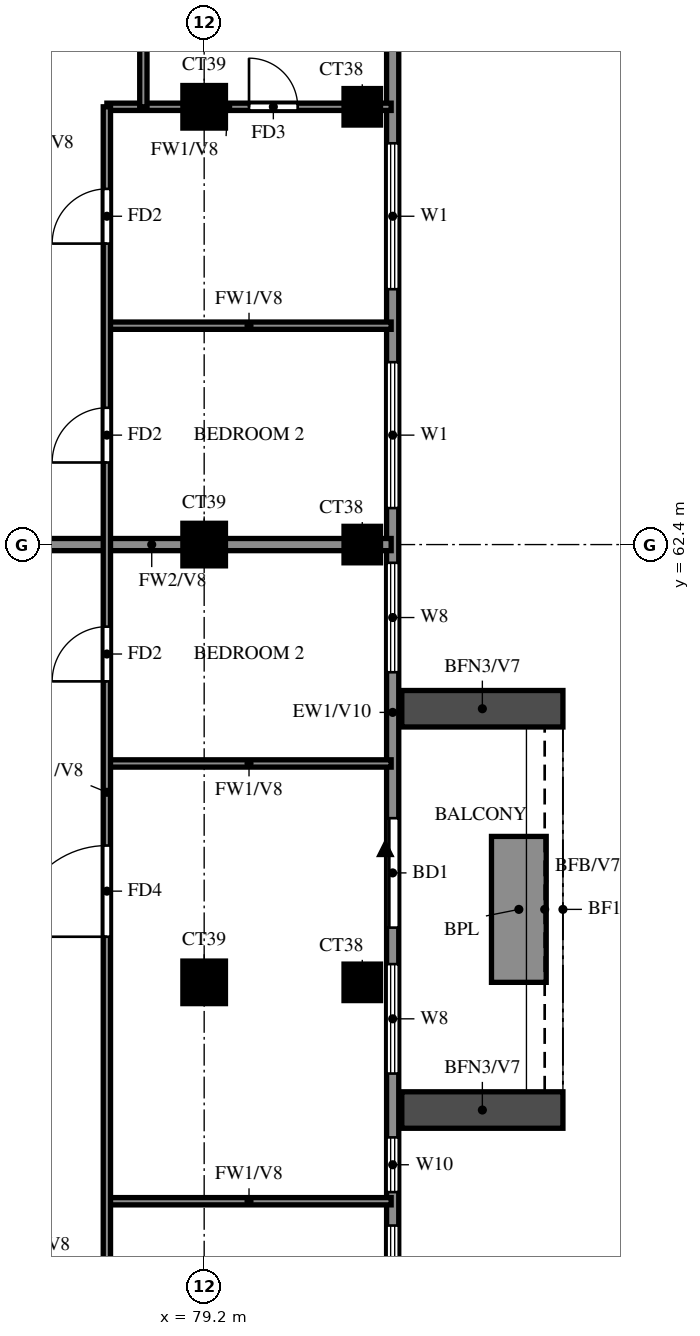
"""IFC4 building model, lengths in metres.
Left out: names, types, materials, properties, quantities, classifications, styles, units other than length and angle.
Written with IfcOpenShell. Run it as: python <this file> out.ifc"""

import sys

from ifc_helpers import new_model, si_unit, direction, frame, frame_2d, origin, origin_2d, place, context, subcontext, project, spatial, rectangle, extrude, source, transform, mapped, element, fill, save


model = new_model("IFC4")
c1 = context("Model", 3, precision=1e-05, world=origin(), true_north=direction((0.0, 1.0)))
c2 = subcontext(c1, "Body", "Model", "MODEL_VIEW")
j1 = project(units=[si_unit("LENGTHUNIT", "METRE"), si_unit("PLANEANGLEUNIT", "RADIAN")], contexts=[c1])
p1 = place(None, origin())
s1 = spatial("IfcSite", under=j1, at=p1, CompositionType="ELEMENT")
p2 = place(p1, origin())
s2 = spatial("IfcBuilding", under=s1, at=p2, CompositionType="ELEMENT")
p3 = place(p2, frame((0.0, 0.0, 267.5)))
s3 = spatial("IfcBuildingStorey", under=s2, at=p3, CompositionType="ELEMENT", Elevation=267.5)
m1 = source(origin(), c2, "Body", "SweptSolid", [
    extrude(rectangle(XDim=0.7, YDim=0.7, at=origin_2d()), origin(), (0.0, 0.0, 1.0), 3.099),
])
p4 = place(p3, frame((79.2, 55.2, 0.0), z_axis=(0.0, 0.0, 1.0), x_axis=(1.0, 0.0, 0.0)))
e1 = element("IfcColumn", 1, at=p4, inside=s3, PredefinedType="COLUMN", context=c2, shape_type="MappedRepresentation", body=[
    mapped(m1, transform((0.0, 0.0, 0.0))),
])
m2 = source(origin(), c2, "Body", "SweptSolid", [
    extrude(rectangle(XDim=0.6, YDim=0.6, at=origin_2d()), origin(), (0.0, 0.0, 1.0), 3.099),
])
p5 = place(p3, frame((81.8, 55.2, 0.0), z_axis=(0.0, 0.0, 1.0), x_axis=(1.0, 0.0, 0.0)))
e2 = element("IfcColumn", 2, at=p5, inside=s3, PredefinedType="COLUMN", context=c2, shape_type="MappedRepresentation", body=[
    mapped(m2, transform((0.0, 0.0, 0.0))),
])
p6 = place(p3, frame((79.2, 62.4, 0.0), z_axis=(0.0, 0.0, 1.0), x_axis=(1.0, 0.0, 0.0)))
e3 = element("IfcColumn", 3, at=p6, inside=s3, PredefinedType="COLUMN", context=c2, shape_type="MappedRepresentation", body=[
    mapped(m1, transform((0.0, 0.0, 0.0))),
])
p7 = place(p3, frame((81.8, 62.4, 0.0), z_axis=(0.0, 0.0, 1.0), x_axis=(1.0, 0.0, 0.0)))
e4 = element("IfcColumn", 4, at=p7, inside=s3, PredefinedType="COLUMN", context=c2, shape_type="MappedRepresentation", body=[
    mapped(m2, transform((0.0, 0.0, 0.0))),
])
p8 = place(p3, frame((79.2, 69.6, 0.0), z_axis=(0.0, 0.0, 1.0), x_axis=(1.0, 0.0, 0.0)))
e5 = element("IfcColumn", 5, at=p8, inside=s3, PredefinedType="COLUMN", context=c2, shape_type="MappedRepresentation", body=[
    mapped(m1, transform((0.0, 0.0, 0.0))),
])
p9 = place(p3, frame((81.8, 69.6, 0.0), z_axis=(0.0, 0.0, 1.0), x_axis=(1.0, 0.0, 0.0)))
e6 = element("IfcColumn", 6, at=p9, inside=s3, PredefinedType="COLUMN", context=c2, shape_type="MappedRepresentation", body=[
    mapped(m2, transform((0.0, 0.0, 0.0))),
])
p10 = place(p3, frame((82.3, 48.2, 0.0), z_axis=(0.0, 0.0, 1.0), x_axis=(0.0, 1.0, 0.0)))
e7 = element("IfcWall", 7, at=p10, inside=s3, PredefinedType="SOLIDWALL", context=c2, shape_type="SweptSolid", body=[
    extrude(rectangle(XDim=28.6, YDim=0.2, at=frame_2d((14.3, 0.0))), origin(), (0.0, 0.0, 1.0), 3.099),
])
p11 = place(p10, frame((7.9, 0.0, 0.0)))
e8 = element("IfcOpeningElement", 8, at=p11, cuts=e7, PredefinedType="OPENING", context=c2, shape_type="SweptSolid", body=[
    extrude(rectangle(XDim=1.8, YDim=2.4, at=frame_2d((0.9, 1.2))), frame((0.0, 0.11, 0.0), z_axis=(0.0, -1.0, 0.0), x_axis=(1.0, 0.0, 0.0)), (0.0, 0.0, 1.0), 0.22),
])
p12 = place(p10, frame((0.6, 0.0, 0.6)))
e9 = element("IfcOpeningElement", 9, at=p12, cuts=e7, PredefinedType="OPENING", context=c2, shape_type="SweptSolid", body=[
    extrude(rectangle(XDim=2.4, YDim=2.4, at=frame_2d((1.2, 1.2))), frame((0.0, 0.11, 0.0), z_axis=(0.0, -1.0, 0.0), x_axis=(1.0, 0.0, 0.0)), (0.0, 0.0, 1.0), 0.22),
])
p13 = place(p10, frame((3.55, 0.0, 0.6)))
e10 = element("IfcOpeningElement", 10, at=p13, cuts=e7, PredefinedType="OPENING", context=c2, shape_type="SweptSolid", body=[
    extrude(rectangle(XDim=0.9, YDim=2.4, at=frame_2d((0.45, 1.2))), frame((0.0, 0.11, 0.0), z_axis=(0.0, -1.0, 0.0), x_axis=(1.0, 0.0, 0.0)), (0.0, 0.0, 1.0), 0.22),
])
p14 = place(p10, frame((5.5, 0.0, 0.6)))
e11 = element("IfcOpeningElement", 11, at=p14, cuts=e7, PredefinedType="OPENING", context=c2, shape_type="SweptSolid", body=[
    extrude(rectangle(XDim=1.8, YDim=2.4, at=frame_2d((0.9, 1.2))), frame((0.0, 0.11, 0.0), z_axis=(0.0, -1.0, 0.0), x_axis=(1.0, 0.0, 0.0)), (0.0, 0.0, 1.0), 0.22),
])
p15 = place(p10, frame((12.1, 0.0, 0.6)))
e12 = element("IfcOpeningElement", 12, at=p15, cuts=e7, PredefinedType="OPENING", context=c2, shape_type="SweptSolid", body=[
    extrude(rectangle(XDim=1.8, YDim=2.4, at=frame_2d((0.9, 1.2))), frame((0.0, 0.11, 0.0), z_axis=(0.0, -1.0, 0.0), x_axis=(1.0, 0.0, 0.0)), (0.0, 0.0, 1.0), 0.22),
])
p16 = place(p10, frame((14.8, 0.0, 0.6)))
e13 = element("IfcOpeningElement", 13, at=p16, cuts=e7, PredefinedType="OPENING", context=c2, shape_type="SweptSolid", body=[
    extrude(rectangle(XDim=2.4, YDim=2.4, at=frame_2d((1.2, 1.2))), frame((0.0, 0.11, 0.0), z_axis=(0.0, -1.0, 0.0), x_axis=(1.0, 0.0, 0.0)), (0.0, 0.0, 1.0), 0.22),
])
p17 = place(p10, frame((18.4, 0.0, 0.6)))
e14 = element("IfcOpeningElement", 14, at=p17, cuts=e7, PredefinedType="OPENING", context=c2, shape_type="SweptSolid", body=[
    extrude(rectangle(XDim=2.4, YDim=2.4, at=frame_2d((1.2, 1.2))), frame((0.0, 0.11, 0.0), z_axis=(0.0, -1.0, 0.0), x_axis=(1.0, 0.0, 0.0)), (0.0, 0.0, 1.0), 0.22),
])
p18 = place(p10, frame((22.75, 0.0, 1.5)))
e15 = element("IfcOpeningElement", 15, at=p18, cuts=e7, PredefinedType="OPENING", context=c2, shape_type="SweptSolid", body=[
    extrude(rectangle(XDim=0.9, YDim=0.9, at=frame_2d((0.45, 0.45))), frame((0.0, 0.11, 0.0), z_axis=(0.0, -1.0, 0.0), x_axis=(1.0, 0.0, 0.0)), (0.0, 0.0, 1.0), 0.22),
])
p19 = place(p10, frame((25.5, 0.0, 0.6)))
e16 = element("IfcOpeningElement", 16, at=p19, cuts=e7, PredefinedType="OPENING", context=c2, shape_type="SweptSolid", body=[
    extrude(rectangle(XDim=2.4, YDim=2.4, at=frame_2d((1.2, 1.2))), frame((0.0, 0.11, 0.0), z_axis=(0.0, -1.0, 0.0), x_axis=(1.0, 0.0, 0.0)), (0.0, 0.0, 1.0), 0.22),
])
for number, where, z_axis, x_axis in (
    (17, (82.45, 53.1, 0.0), (0.0, 0.0, 1.0), (1.0, 0.0, 0.0)),
    (18, (82.45, 59.7, 0.0), (0.0, 0.0, 1.0), (1.0, 0.0, 0.0)),
):
    element("IfcWall", number, at=place(p3, frame(where, z_axis=z_axis, x_axis=x_axis)), inside=s3, PredefinedType="SOLIDWALL", context=c2, shape_type="SweptSolid", body=[
        extrude(rectangle(XDim=2.65, YDim=0.6, at=frame_2d((1.325, 0.0))), origin(), (0.0, 0.0, 1.0), 2.729),
    ])
p20 = place(p3, frame((84.375, 55.2, 0.0), z_axis=(0.0, 0.0, 1.0), x_axis=(0.0, 1.0, 0.0)))
e19 = element("IfcWall", 19, at=p20, inside=s3, PredefinedType="SOLIDWALL", context=c2, shape_type="SweptSolid", body=[
    extrude(rectangle(XDim=2.4, YDim=0.9, at=frame_2d((1.2, 0.0))), origin(), (0.0, 0.0, 1.0), 0.9),
])
p21 = place(p3, frame((74.4, 62.4, 0.0), z_axis=(0.0, 0.0, 1.0), x_axis=(1.0, 0.0, 0.0)))
e20 = element("IfcWall", 20, at=p21, inside=s3, PredefinedType="SOLIDWALL", context=c2, shape_type="SweptSolid", body=[
    extrude(rectangle(XDim=7.875, YDim=0.2, at=frame_2d((3.938, 0.0))), origin(), (0.0, 0.0, 1.0), 3.099),
])
for number, where, z_axis, x_axis in (
    (21, (77.6, 51.6, 0.0), (0.0, 0.0, 1.0), (1.0, 0.0, 0.0)),
    (22, (77.6, 58.8, 0.0), (0.0, 0.0, 1.0), (1.0, 0.0, 0.0)),
    (23, (77.6, 66.0, 0.0), (0.0, 0.0, 1.0), (1.0, 0.0, 0.0)),
):
    element("IfcWall", number, at=place(p3, frame(where, z_axis=z_axis, x_axis=x_axis)), inside=s3, PredefinedType="PARTITIONING", context=c2, shape_type="SweptSolid", body=[
        extrude(rectangle(XDim=4.675, YDim=0.12, at=frame_2d((2.337, 0.0))), origin(), (0.0, 0.0, 1.0), 3.099),
    ])
p22 = place(p3, frame((77.6, 69.6, 0.0), z_axis=(0.0, 0.0, 1.0), x_axis=(1.0, 0.0, 0.0)))
e24 = element("IfcWall", 24, at=p22, inside=s3, PredefinedType="PARTITIONING", context=c2, shape_type="SweptSolid", body=[
    extrude(rectangle(XDim=4.675, YDim=0.12, at=frame_2d((2.337, 0.0))), origin(), (0.0, 0.0, 1.0), 3.099),
])
p23 = place(p22, frame((2.337, 0.0, 0.0)))
e25 = element("IfcOpeningElement", 25, at=p23, cuts=e24, PredefinedType="OPENING", context=c2, shape_type="SweptSolid", body=[
    extrude(rectangle(XDim=0.8, YDim=2.1, at=frame_2d((0.4, 1.05))), frame((0.0, 0.07, 0.0), z_axis=(0.0, -1.0, 0.0), x_axis=(1.0, 0.0, 0.0)), (0.0, 0.0, 1.0), 0.14),
])
p24 = place(p3, frame((77.6, 48.125, 0.0), z_axis=(0.0, 0.0, 1.0), x_axis=(0.0, 1.0, 0.0)))
e26 = element("IfcWall", 26, at=p24, inside=s3, PredefinedType="PARTITIONING", context=c2, shape_type="SweptSolid", body=[
    extrude(rectangle(XDim=21.475, YDim=0.12, at=frame_2d((10.738, 0.0))), origin(), (0.0, 0.0, 1.0), 3.099),
])
p25 = place(p24, frame((1.288, 0.0, 0.0)))
e27 = element("IfcOpeningElement", 27, at=p25, cuts=e26, PredefinedType="OPENING", context=c2, shape_type="SweptSolid", body=[
    extrude(rectangle(XDim=0.9, YDim=2.1, at=frame_2d((0.45, 1.05))), frame((0.0, 0.07, 0.0), z_axis=(0.0, -1.0, 0.0), x_axis=(1.0, 0.0, 0.0)), (0.0, 0.0, 1.0), 0.14),
])
p26 = place(p24, frame((7.825, 0.0, 0.0)))
e28 = element("IfcOpeningElement", 28, at=p26, cuts=e26, PredefinedType="OPENING", context=c2, shape_type="SweptSolid", body=[
    extrude(rectangle(XDim=1.5, YDim=2.1, at=frame_2d((0.75, 1.05))), frame((0.0, 0.07, 0.0), z_axis=(0.0, -1.0, 0.0), x_axis=(1.0, 0.0, 0.0)), (0.0, 0.0, 1.0), 0.14),
])
p27 = place(p24, frame((12.025, 0.0, 0.0)))
e29 = element("IfcOpeningElement", 29, at=p27, cuts=e26, PredefinedType="OPENING", context=c2, shape_type="SweptSolid", body=[
    extrude(rectangle(XDim=0.9, YDim=2.1, at=frame_2d((0.45, 1.05))), frame((0.0, 0.07, 0.0), z_axis=(0.0, -1.0, 0.0), x_axis=(1.0, 0.0, 0.0)), (0.0, 0.0, 1.0), 0.14),
])
p28 = place(p24, frame((15.625, 0.0, 0.0)))
e30 = element("IfcOpeningElement", 30, at=p28, cuts=e26, PredefinedType="OPENING", context=c2, shape_type="SweptSolid", body=[
    extrude(rectangle(XDim=0.9, YDim=2.1, at=frame_2d((0.45, 1.05))), frame((0.0, 0.07, 0.0), z_axis=(0.0, -1.0, 0.0), x_axis=(1.0, 0.0, 0.0)), (0.0, 0.0, 1.0), 0.14),
])
p29 = place(p24, frame((19.225, 0.0, 0.0)))
e31 = element("IfcOpeningElement", 31, at=p29, cuts=e26, PredefinedType="OPENING", context=c2, shape_type="SweptSolid", body=[
    extrude(rectangle(XDim=0.9, YDim=2.1, at=frame_2d((0.45, 1.05))), frame((0.0, 0.07, 0.0), z_axis=(0.0, -1.0, 0.0), x_axis=(1.0, 0.0, 0.0)), (0.0, 0.0, 1.0), 0.14),
])
p30 = place(p3, frame((78.2, 69.6, 0.0), z_axis=(0.0, 0.0, 1.0), x_axis=(0.0, 1.0, 0.0)))
e32 = element("IfcWall", 32, at=p30, inside=s3, PredefinedType="PARTITIONING", context=c2, shape_type="SweptSolid", body=[
    extrude(rectangle(XDim=3.6, YDim=0.12, at=frame_2d((1.8, 0.0))), origin(), (0.0, 0.0, 1.0), 3.099),
])
p31 = place(p11, origin())
e33 = element("IfcDoor", 33, at=p31, inside=s3, OperationType="DOUBLE_DOOR_SLIDING", PredefinedType="DOOR", context=c2, shape_type="SweptSolid", body=[
    extrude(rectangle(XDim=1.8, YDim=2.4, at=frame_2d((0.9, 1.2))), frame((0.0, 0.025, 0.0), z_axis=(0.0, -1.0, 0.0), x_axis=(1.0, 0.0, 0.0)), (0.0, 0.0, 1.0), 0.05),
])
fill(e8, e33)
p32 = place(p12, origin())
e34 = element("IfcWindow", 34, at=p32, inside=s3, PartitioningType="DOUBLE_PANEL_VERTICAL", PredefinedType="WINDOW", context=c2, shape_type="SweptSolid", body=[
    extrude(rectangle(XDim=2.4, YDim=2.4, at=frame_2d((1.2, 1.2))), frame((0.0, 0.03, 0.0), z_axis=(0.0, -1.0, 0.0), x_axis=(1.0, 0.0, 0.0)), (0.0, 0.0, 1.0), 0.06),
])
fill(e9, e34)
p33 = place(p13, origin())
e35 = element("IfcWindow", 35, at=p33, inside=s3, PartitioningType="SINGLE_PANEL", PredefinedType="WINDOW", context=c2, shape_type="SweptSolid", body=[
    extrude(rectangle(XDim=0.9, YDim=2.4, at=frame_2d((0.45, 1.2))), frame((0.0, 0.03, 0.0), z_axis=(0.0, -1.0, 0.0), x_axis=(1.0, 0.0, 0.0)), (0.0, 0.0, 1.0), 0.06),
])
fill(e10, e35)
p34 = place(p14, origin())
e36 = element("IfcWindow", 36, at=p34, inside=s3, PartitioningType="DOUBLE_PANEL_VERTICAL", PredefinedType="WINDOW", context=c2, shape_type="SweptSolid", body=[
    extrude(rectangle(XDim=1.8, YDim=2.4, at=frame_2d((0.9, 1.2))), frame((0.0, 0.03, 0.0), z_axis=(0.0, -1.0, 0.0), x_axis=(1.0, 0.0, 0.0)), (0.0, 0.0, 1.0), 0.06),
])
fill(e11, e36)
p35 = place(p15, origin())
e37 = element("IfcWindow", 37, at=p35, inside=s3, PartitioningType="DOUBLE_PANEL_VERTICAL", PredefinedType="WINDOW", context=c2, shape_type="SweptSolid", body=[
    extrude(rectangle(XDim=1.8, YDim=2.4, at=frame_2d((0.9, 1.2))), frame((0.0, 0.03, 0.0), z_axis=(0.0, -1.0, 0.0), x_axis=(1.0, 0.0, 0.0)), (0.0, 0.0, 1.0), 0.06),
])
fill(e12, e37)
p36 = place(p16, origin())
e38 = element("IfcWindow", 38, at=p36, inside=s3, PartitioningType="DOUBLE_PANEL_VERTICAL", PredefinedType="WINDOW", context=c2, shape_type="SweptSolid", body=[
    extrude(rectangle(XDim=2.4, YDim=2.4, at=frame_2d((1.2, 1.2))), frame((0.0, 0.03, 0.0), z_axis=(0.0, -1.0, 0.0), x_axis=(1.0, 0.0, 0.0)), (0.0, 0.0, 1.0), 0.06),
])
fill(e13, e38)
p37 = place(p17, origin())
e39 = element("IfcWindow", 39, at=p37, inside=s3, PartitioningType="DOUBLE_PANEL_VERTICAL", PredefinedType="WINDOW", context=c2, shape_type="SweptSolid", body=[
    extrude(rectangle(XDim=2.4, YDim=2.4, at=frame_2d((1.2, 1.2))), frame((0.0, 0.03, 0.0), z_axis=(0.0, -1.0, 0.0), x_axis=(1.0, 0.0, 0.0)), (0.0, 0.0, 1.0), 0.06),
])
fill(e14, e39)
p38 = place(p26, origin())
e40 = element("IfcDoor", 40, at=p38, inside=s3, OperationType="SINGLE_SWING_RIGHT", PredefinedType="DOOR", context=c2, shape_type="SweptSolid", body=[
    extrude(rectangle(XDim=1.5, YDim=2.1, at=frame_2d((0.75, 1.05))), frame((0.0, 0.025, 0.0), z_axis=(0.0, -1.0, 0.0), x_axis=(1.0, 0.0, 0.0)), (0.0, 0.0, 1.0), 0.05),
])
fill(e28, e40)
p39 = place(p27, origin())
e41 = element("IfcDoor", 41, at=p39, inside=s3, OperationType="SINGLE_SWING_RIGHT", PredefinedType="DOOR", context=c2, shape_type="SweptSolid", body=[
    extrude(rectangle(XDim=0.9, YDim=2.1, at=frame_2d((0.45, 1.05))), frame((0.0, 0.025, 0.0), z_axis=(0.0, -1.0, 0.0), x_axis=(1.0, 0.0, 0.0)), (0.0, 0.0, 1.0), 0.05),
])
fill(e29, e41)
p40 = place(p28, origin())
e42 = element("IfcDoor", 42, at=p40, inside=s3, OperationType="SINGLE_SWING_LEFT", PredefinedType="DOOR", context=c2, shape_type="SweptSolid", body=[
    extrude(rectangle(XDim=0.9, YDim=2.1, at=frame_2d((0.45, 1.05))), frame((0.0, 0.025, 0.0), z_axis=(0.0, -1.0, 0.0), x_axis=(1.0, 0.0, 0.0)), (0.0, 0.0, 1.0), 0.05),
])
fill(e30, e42)
p41 = place(p29, origin())
e43 = element("IfcDoor", 43, at=p41, inside=s3, OperationType="SINGLE_SWING_LEFT", PredefinedType="DOOR", context=c2, shape_type="SweptSolid", body=[
    extrude(rectangle(XDim=0.9, YDim=2.1, at=frame_2d((0.45, 1.05))), frame((0.0, 0.025, 0.0), z_axis=(0.0, -1.0, 0.0), x_axis=(1.0, 0.0, 0.0)), (0.0, 0.0, 1.0), 0.05),
])
fill(e31, e43)
p42 = place(p23, origin())
e44 = element("IfcDoor", 44, at=p42, inside=s3, OperationType="SINGLE_SWING_LEFT", PredefinedType="DOOR", context=c2, shape_type="SweptSolid", body=[
    extrude(rectangle(XDim=0.8, YDim=2.1, at=frame_2d((0.4, 1.05))), frame((0.0, 0.025, 0.0), z_axis=(0.0, -1.0, 0.0), x_axis=(1.0, 0.0, 0.0)), (0.0, 0.0, 1.0), 0.05),
])
fill(e25, e44)
save(model, sys.argv[1])
